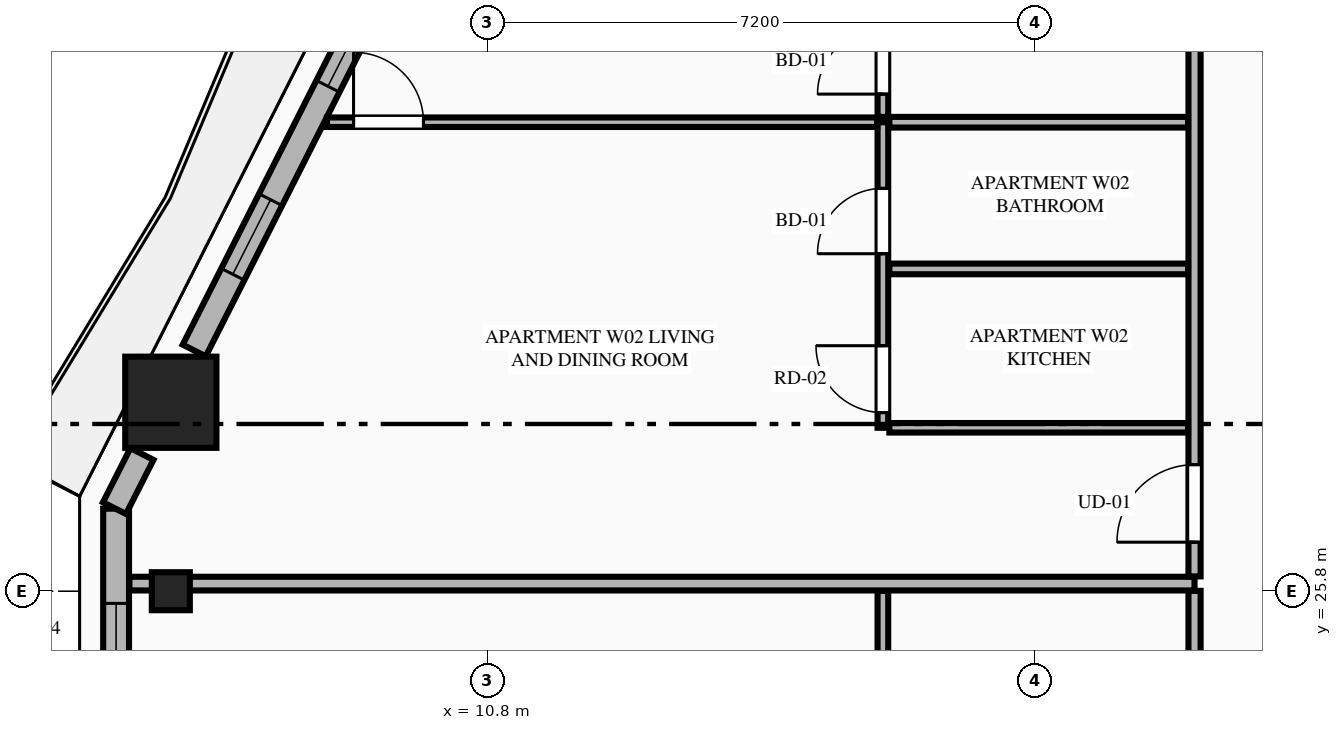
"""IFC4 building model, lengths in metres.
Left out: names, types, materials, properties, quantities, classifications, styles, units other than length and angle.
Written with IfcOpenShell. Run it as: python <this file> out.ifc"""

import sys

from ifc_helpers import new_model, si_unit, direction, frame, frame_2d, origin, origin_2d, place, context, subcontext, project, spatial, rectangle, extrude, element, fill, save


model = new_model("IFC4")
c1 = context("Model", 3, precision=1e-05, world=origin(), true_north=direction((0.0, 1.0)))
c2 = subcontext(c1, "Body", "Model", "MODEL_VIEW")
j1 = project(units=[si_unit("LENGTHUNIT", "METRE"), si_unit("PLANEANGLEUNIT", "RADIAN")], contexts=[c1])
p1 = place(None, origin())
s1 = spatial("IfcSite", under=j1, at=p1, CompositionType="ELEMENT")
p2 = place(p1, origin())
s2 = spatial("IfcBuilding", under=s1, at=p2, CompositionType="ELEMENT")
p3 = place(p2, frame((0.0, 0.0, 35.55)))
s3 = spatial("IfcBuildingStorey", under=s2, at=p3, CompositionType="ELEMENT", Elevation=35.55)
p4 = place(p3, frame((6.632, 28.286, 0.0), z_axis=(0.0, 0.0, 1.0), x_axis=(1.0, 0.0, 0.0)))
e1 = element("IfcColumn", 1, at=p4, inside=s3, PredefinedType="COLUMN", context=c2, shape_type="SweptSolid", body=[
    extrude(rectangle(XDim=1.2, YDim=1.2, at=origin_2d()), origin(), (0.0, 0.0, 1.0), 3.55),
])
p5 = place(p3, frame((6.632, 25.8, 0.0), z_axis=(0.0, 0.0, 1.0), x_axis=(0.0, -1.0, 0.0)))
e2 = element("IfcColumn", 2, at=p5, inside=s3, PredefinedType="PILASTER", context=c2, shape_type="SweptSolid", body=[
    extrude(rectangle(XDim=0.5, YDim=0.35, at=origin_2d()), origin(), (0.0, 0.0, 1.0), 3.55),
])
p6 = place(p3, frame((5.912, 26.886, 0.0), z_axis=(0.0, 0.0, 1.0), x_axis=(0.0, -1.0, 0.0)))
e3 = element("IfcWall", 3, at=p6, inside=s3, PredefinedType="STANDARD", context=c2, shape_type="SweptSolid", body=[
    extrude(rectangle(XDim=2.172, YDim=0.34, at=frame_2d((1.086, 0.0))), origin(), (0.0, 0.0, 1.0), 3.33),
])
p7 = place(p6, frame((1.246, 0.0, 0.75)))
e4 = element("IfcOpeningElement", 4, at=p7, cuts=e3, PredefinedType="OPENING", context=c2, shape_type="SweptSolid", body=[
    extrude(rectangle(XDim=0.686, YDim=2.0, at=frame_2d((0.343, 1.0))), frame((0.0, 0.18, 0.0), z_axis=(0.0, -1.0, 0.0), x_axis=(1.0, 0.0, 0.0)), (0.0, 0.0, 1.0), 0.36),
])
p8 = place(p3, frame((9.335, 33.699, 0.0), z_axis=(0.0, 0.0, 1.0), x_axis=(-0.451590635984, -0.892225250422, 0.0)))
e5 = element("IfcWall", 5, at=p8, inside=s3, PredefinedType="STANDARD", context=c2, shape_type="SweptSolid", body=[
    extrude(rectangle(XDim=5.303, YDim=0.34, at=frame_2d((2.652, 0.0))), origin(), (0.0, 0.0, 1.0), 2.787),
])
p9 = place(p8, frame((0.308, 0.0, 0.75)))
e6 = element("IfcOpeningElement", 6, at=p9, cuts=e5, PredefinedType="OPENING", context=c2, shape_type="SweptSolid", body=[
    extrude(rectangle(XDim=1.1, YDim=1.887, at=frame_2d((0.55, 0.943))), frame((0.0, 0.18, 0.0), z_axis=(0.0, -1.0, 0.0), x_axis=(1.0, 0.0, 0.0)), (0.0, 0.0, 1.0), 0.36),
])
p10 = place(p8, frame((3.08, 0.0, 0.75)))
e7 = element("IfcOpeningElement", 7, at=p10, cuts=e5, PredefinedType="OPENING", context=c2, shape_type="SweptSolid", body=[
    extrude(rectangle(XDim=1.1, YDim=1.887, at=frame_2d((0.55, 0.943))), frame((0.0, 0.18, 0.0), z_axis=(0.0, -1.0, 0.0), x_axis=(1.0, 0.0, 0.0)), (0.0, 0.0, 1.0), 0.36),
])
p11 = place(p3, frame((6.252, 27.605, 0.0), z_axis=(0.0, 0.0, 1.0), x_axis=(-0.452101093511, -0.891966704113, 0.0)))
e8 = element("IfcWall", 8, at=p11, inside=s3, PredefinedType="STANDARD", context=c2, shape_type="SweptSolid", body=[
    extrude(rectangle(XDim=0.798, YDim=0.34, at=frame_2d((0.399, 0.0))), origin(), (0.0, 0.0, 1.0), 3.33),
])
p12 = place(p3, frame((20.1, 16.045, 0.0), z_axis=(0.0, 0.0, 1.0), x_axis=(0.0, 1.0, 0.0)))
e9 = element("IfcWall", 9, at=p12, inside=s3, PredefinedType="PARTITIONING", context=c2, shape_type="SweptSolid", body=[
    extrude(rectangle(XDim=9.76, YDim=0.16, at=frame_2d((4.88, 0.0))), origin(), (0.0, 0.0, 1.0), 2.7),
])
p13 = place(p12, frame((0.45, 0.0, 0.0)))
e10 = element("IfcOpeningElement", 10, at=p13, cuts=e9, PredefinedType="OPENING", context=c2, shape_type="SweptSolid", body=[
    extrude(rectangle(XDim=1.02, YDim=2.25, at=frame_2d((0.51, 1.125))), frame((0.0, 0.09, 0.0), z_axis=(0.0, -1.0, 0.0), x_axis=(1.0, 0.0, 0.0)), (0.0, 0.0, 1.0), 0.18),
])
p14 = place(p3, frame((16.0, 22.12, 0.0), z_axis=(0.0, 0.0, 1.0), x_axis=(0.0, 1.0, 0.0)))
e11 = element("IfcWall", 11, at=p14, inside=s3, PredefinedType="PLUMBINGWALL", context=c2, shape_type="SweptSolid", body=[
    extrude(rectangle(XDim=3.685, YDim=0.14, at=frame_2d((1.842, 0.0))), origin(), (0.0, 0.0, 1.0), 3.33),
])
p15 = place(p14, frame((0.3, 0.0, 0.0)))
e12 = element("IfcOpeningElement", 12, at=p15, cuts=e11, PredefinedType="OPENING", context=c2, shape_type="SweptSolid", body=[
    extrude(rectangle(XDim=0.86, YDim=2.1, at=frame_2d((0.43, 1.05))), frame((0.0, 0.08, 0.0), z_axis=(0.0, -1.0, 0.0), x_axis=(1.0, 0.0, 0.0)), (0.0, 0.0, 1.0), 0.16),
])
p16 = place(p3, frame((6.087, 25.9, 0.0), z_axis=(0.0, 0.0, 1.0), x_axis=(1.0, 0.0, 0.0)))
e13 = element("IfcWall", 13, at=p16, inside=s3, PredefinedType="PARTITIONING", context=c2, shape_type="SweptSolid", body=[
    extrude(rectangle(XDim=14.013, YDim=0.18, at=frame_2d((7.007, 0.0))), origin(), (0.0, 0.0, 1.0), 3.33),
])
p17 = place(p3, frame((20.1, 25.995, 0.0), z_axis=(0.0, 0.0, 1.0), x_axis=(0.0, 1.0, 0.0)))
e14 = element("IfcWall", 14, at=p17, inside=s3, PredefinedType="PARTITIONING", context=c2, shape_type="SweptSolid", body=[
    extrude(rectangle(XDim=9.76, YDim=0.16, at=frame_2d((4.88, 0.0))), origin(), (0.0, 0.0, 1.0), 2.7),
])
p18 = place(p17, frame((0.45, 0.0, 0.0)))
e15 = element("IfcOpeningElement", 15, at=p18, cuts=e14, PredefinedType="OPENING", context=c2, shape_type="SweptSolid", body=[
    extrude(rectangle(XDim=1.02, YDim=2.25, at=frame_2d((0.51, 1.125))), frame((0.0, 0.09, 0.0), z_axis=(0.0, -1.0, 0.0), x_axis=(1.0, 0.0, 0.0)), (0.0, 0.0, 1.0), 0.18),
])
p19 = place(p3, frame((16.085, 27.95, 0.0), z_axis=(0.0, 0.0, 1.0), x_axis=(1.0, 0.0, 0.0)))
e16 = element("IfcWall", 16, at=p19, inside=s3, PredefinedType="PARTITIONING", context=c2, shape_type="SweptSolid", body=[
    extrude(rectangle(XDim=3.93, YDim=0.125, at=frame_2d((1.965, 0.0))), origin(), (0.0, 0.0, 1.0), 3.33),
])
p20 = place(p3, frame((16.0, 27.95, 0.0), z_axis=(0.0, 0.0, 1.0), x_axis=(0.0, 1.0, 0.0)))
e17 = element("IfcWall", 17, at=p20, inside=s3, PredefinedType="PLUMBINGWALL", context=c2, shape_type="SweptSolid", body=[
    extrude(rectangle(XDim=4.02, YDim=0.14, at=frame_2d((2.01, 0.0))), origin(), (0.0, 0.0, 1.0), 3.33),
])
p21 = place(p20, frame((0.2, 0.0, 0.0)))
e18 = element("IfcOpeningElement", 18, at=p21, cuts=e17, PredefinedType="OPENING", context=c2, shape_type="SweptSolid", body=[
    extrude(rectangle(XDim=0.88, YDim=2.15, at=frame_2d((0.44, 1.075))), frame((0.0, 0.08, 0.0), z_axis=(0.0, -1.0, 0.0), x_axis=(1.0, 0.0, 0.0)), (0.0, 0.0, 1.0), 0.16),
])
p22 = place(p20, frame((2.29, 0.0, 0.0)))
e19 = element("IfcOpeningElement", 19, at=p22, cuts=e17, PredefinedType="OPENING", context=c2, shape_type="SweptSolid", body=[
    extrude(rectangle(XDim=0.86, YDim=2.1, at=frame_2d((0.43, 1.05))), frame((0.0, 0.08, 0.0), z_axis=(0.0, -1.0, 0.0), x_axis=(1.0, 0.0, 0.0)), (0.0, 0.0, 1.0), 0.16),
])
p23 = place(p3, frame((16.0, 32.04, 0.0), z_axis=(0.0, 0.0, 1.0), x_axis=(0.0, 1.0, 0.0)))
e20 = element("IfcWall", 20, at=p23, inside=s3, PredefinedType="PLUMBINGWALL", context=c2, shape_type="SweptSolid", body=[
    extrude(rectangle(XDim=3.715, YDim=0.14, at=frame_2d((1.857, 0.0))), origin(), (0.0, 0.0, 1.0), 3.33),
])
p24 = place(p23, frame((0.3, 0.0, 0.0)))
e21 = element("IfcOpeningElement", 21, at=p24, cuts=e20, PredefinedType="OPENING", context=c2, shape_type="SweptSolid", body=[
    extrude(rectangle(XDim=0.86, YDim=2.1, at=frame_2d((0.43, 1.05))), frame((0.0, 0.08, 0.0), z_axis=(0.0, -1.0, 0.0), x_axis=(1.0, 0.0, 0.0)), (0.0, 0.0, 1.0), 0.16),
])
p25 = place(p3, frame((16.085, 31.97, 0.0), z_axis=(0.0, 0.0, 1.0), x_axis=(1.0, 0.0, 0.0)))
e22 = element("IfcWall", 22, at=p25, inside=s3, PredefinedType="PLUMBINGWALL", context=c2, shape_type="SweptSolid", body=[
    extrude(rectangle(XDim=3.93, YDim=0.14, at=frame_2d((1.965, 0.0))), origin(), (0.0, 0.0, 1.0), 3.33),
])
p26 = place(p3, frame((8.686, 31.97, 0.0), z_axis=(0.0, 0.0, 1.0), x_axis=(1.0, 0.0, 0.0)))
e23 = element("IfcWall", 23, at=p26, inside=s3, PredefinedType="PARTITIONING", context=c2, shape_type="SweptSolid", body=[
    extrude(rectangle(XDim=7.239, YDim=0.125, at=frame_2d((3.62, 0.0))), origin(), (0.0, 0.0, 1.0), 3.33),
])
p27 = place(p26, frame((0.35, 0.0, 0.0)))
e24 = element("IfcOpeningElement", 24, at=p27, cuts=e23, PredefinedType="OPENING", context=c2, shape_type="SweptSolid", body=[
    extrude(rectangle(XDim=0.92, YDim=2.15, at=frame_2d((0.46, 1.075))), frame((0.0, 0.073, 0.0), z_axis=(0.0, -1.0, 0.0), x_axis=(1.0, 0.0, 0.0)), (0.0, 0.0, 1.0), 0.145),
])
p28 = place(p3, frame((16.085, 30.04, 0.0), z_axis=(0.0, 0.0, 1.0), x_axis=(1.0, 0.0, 0.0)))
e25 = element("IfcWall", 25, at=p28, inside=s3, PredefinedType="PLUMBINGWALL", context=c2, shape_type="SweptSolid", body=[
    extrude(rectangle(XDim=3.93, YDim=0.14, at=frame_2d((1.965, 0.0))), origin(), (0.0, 0.0, 1.0), 3.33),
])
p29 = place(p9, origin())
e26 = element("IfcWindow", 26, at=p29, inside=s3, PartitioningType="SINGLE_PANEL", PredefinedType="WINDOW", context=c2, shape_type="SweptSolid", body=[
    extrude(rectangle(XDim=1.1, YDim=1.887, at=frame_2d((0.55, 0.943))), frame((0.0, 0.03, 0.0), z_axis=(0.0, -1.0, 0.0), x_axis=(1.0, 0.0, 0.0)), (0.0, 0.0, 1.0), 0.06),
])
fill(e6, e26)
p30 = place(p21, origin())
e27 = element("IfcDoor", 27, at=p30, inside=s3, OperationType="SINGLE_SWING_RIGHT", PredefinedType="DOOR", context=c2, shape_type="SweptSolid", body=[
    extrude(rectangle(XDim=0.88, YDim=2.15, at=frame_2d((0.44, 1.075))), frame((0.0, 0.025, 0.0), z_axis=(0.0, -1.0, 0.0), x_axis=(1.0, 0.0, 0.0)), (0.0, 0.0, 1.0), 0.05),
])
fill(e18, e27)
p31 = place(p22, origin())
e28 = element("IfcDoor", 28, at=p31, inside=s3, OperationType="SINGLE_SWING_LEFT", PredefinedType="DOOR", context=c2, shape_type="SweptSolid", body=[
    extrude(rectangle(XDim=0.86, YDim=2.1, at=frame_2d((0.43, 1.05))), frame((0.0, 0.025, 0.0), z_axis=(0.0, -1.0, 0.0), x_axis=(1.0, 0.0, 0.0)), (0.0, 0.0, 1.0), 0.05),
])
fill(e19, e28)
p32 = place(p24, origin())
e29 = element("IfcDoor", 29, at=p32, inside=s3, OperationType="SINGLE_SWING_LEFT", PredefinedType="DOOR", context=c2, shape_type="SweptSolid", body=[
    extrude(rectangle(XDim=0.86, YDim=2.1, at=frame_2d((0.43, 1.05))), frame((0.0, 0.025, 0.0), z_axis=(0.0, -1.0, 0.0), x_axis=(1.0, 0.0, 0.0)), (0.0, 0.0, 1.0), 0.05),
])
fill(e21, e29)
p33 = place(p18, origin())
e30 = element("IfcDoor", 30, at=p33, inside=s3, OperationType="SINGLE_SWING_LEFT", PredefinedType="DOOR", context=c2, shape_type="SweptSolid", body=[
    extrude(rectangle(XDim=1.02, YDim=2.25, at=frame_2d((0.51, 1.125))), frame((0.0, 0.025, 0.0), z_axis=(0.0, -1.0, 0.0), x_axis=(1.0, 0.0, 0.0)), (0.0, 0.0, 1.0), 0.05),
])
fill(e15, e30)
p34 = place(p27, origin())
e31 = element("IfcDoor", 31, at=p34, inside=s3, OperationType="SINGLE_SWING_LEFT", PredefinedType="DOOR", context=c2, shape_type="SweptSolid", body=[
    extrude(rectangle(XDim=0.92, YDim=2.15, at=frame_2d((0.46, 1.075))), frame((0.0, 0.025, 0.0), z_axis=(0.0, -1.0, 0.0), x_axis=(1.0, 0.0, 0.0)), (0.0, 0.0, 1.0), 0.05),
])
fill(e24, e31)
p35 = place(p10, origin())
e32 = element("IfcWindow", 32, at=p35, inside=s3, PartitioningType="SINGLE_PANEL", PredefinedType="WINDOW", context=c2, shape_type="SweptSolid", body=[
    extrude(rectangle(XDim=1.1, YDim=1.887, at=frame_2d((0.55, 0.943))), frame((0.0, 0.03, 0.0), z_axis=(0.0, -1.0, 0.0), x_axis=(1.0, 0.0, 0.0)), (0.0, 0.0, 1.0), 0.06),
])
fill(e7, e32)
p36 = place(p7, origin())
e33 = element("IfcWindow", 33, at=p36, inside=s3, PartitioningType="SINGLE_PANEL", PredefinedType="WINDOW", context=c2, shape_type="SweptSolid", body=[
    extrude(rectangle(XDim=0.686, YDim=2.0, at=frame_2d((0.343, 1.0))), frame((0.0, 0.03, 0.0), z_axis=(0.0, -1.0, 0.0), x_axis=(1.0, 0.0, 0.0)), (0.0, 0.0, 1.0), 0.06),
])
fill(e4, e33)
save(model, sys.argv[1])
